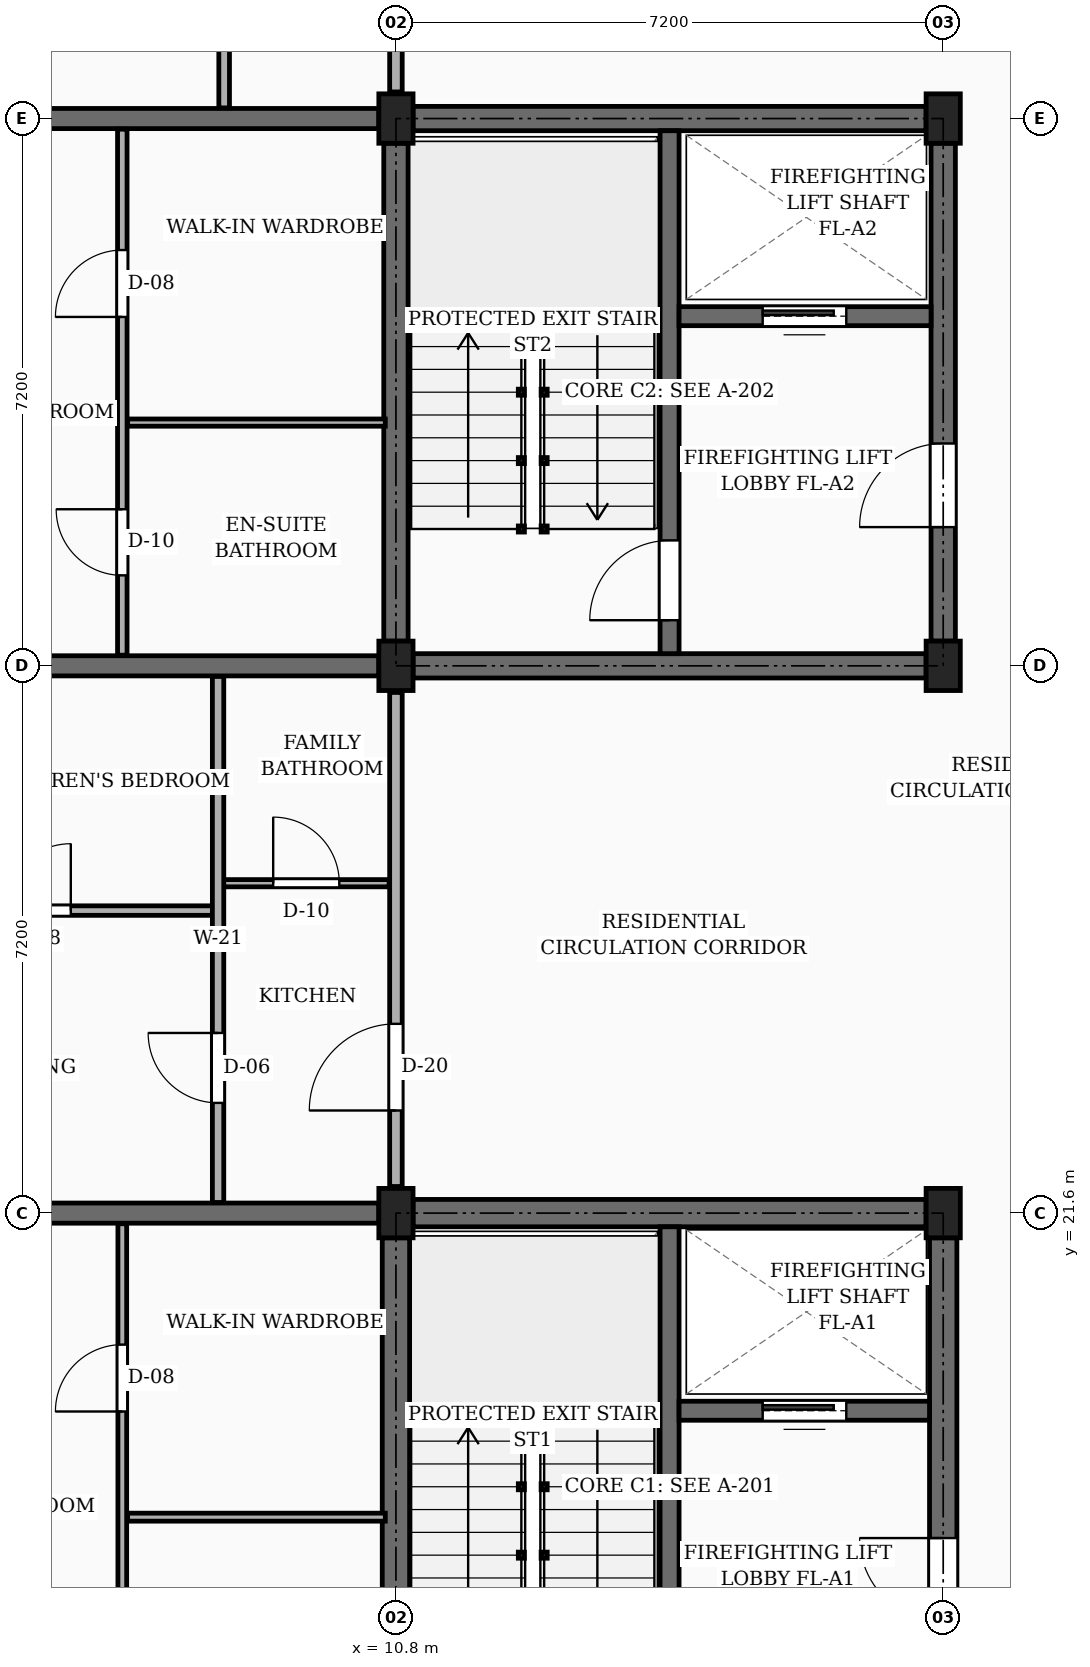
"""IFC4 building model, lengths in metres.
Left out: names, types, materials, properties, quantities, classifications, styles, units other than length and angle.
Written with IfcOpenShell. Run it as: python <this file> out.ifc"""

import sys

from ifc_helpers import new_model, si_unit, direction, frame, frame_2d, origin, origin_2d, place, context, subcontext, project, spatial, rectangle, extrude, element, fill, save


model = new_model("IFC4")
c1 = context("Model", 3, precision=1e-05, world=origin(), true_north=direction((0.0, 1.0)))
c2 = subcontext(c1, "Body", "Model", "MODEL_VIEW")
j1 = project(units=[si_unit("LENGTHUNIT", "METRE"), si_unit("PLANEANGLEUNIT", "RADIAN")], contexts=[c1])
p1 = place(None, origin())
s1 = spatial("IfcSite", under=j1, at=p1, CompositionType="ELEMENT")
p2 = place(p1, origin())
s2 = spatial("IfcBuilding", under=s1, at=p2, CompositionType="ELEMENT")
p3 = place(p2, frame((0.0, 0.0, 10.8)))
s3 = spatial("IfcBuildingStorey", under=s2, at=p3, CompositionType="ELEMENT", Elevation=10.8)
for number, where, z_axis, x_axis in (
    (1, (10.8, 21.6, 0.0), (0.0, 0.0, 1.0), (1.0, 0.0, 0.0)),
    (2, (10.8, 28.8, 0.0), (0.0, 0.0, 1.0), (1.0, 0.0, 0.0)),
    (3, (10.8, 36.0, 0.0), (0.0, 0.0, 1.0), (1.0, 0.0, 0.0)),
    (4, (18.0, 21.6, 0.0), (0.0, 0.0, 1.0), (1.0, 0.0, 0.0)),
    (5, (18.0, 28.8, 0.0), (0.0, 0.0, 1.0), (1.0, 0.0, 0.0)),
    (6, (18.0, 36.0, 0.0), (0.0, 0.0, 1.0), (1.0, 0.0, 0.0)),
):
    element("IfcColumn", number, at=place(p3, frame(where, z_axis=z_axis, x_axis=x_axis)), inside=s3, PredefinedType="COLUMN", context=c2, shape_type="SweptSolid", body=[
        extrude(rectangle(XDim=0.45, YDim=0.65, at=origin_2d()), origin(), (0.0, 0.0, 1.0), 3.15),
    ])
p4 = place(p3, frame((3.875, 21.6, 0.0), z_axis=(0.0, 0.0, 1.0), x_axis=(1.0, 0.0, 0.0)))
e7 = element("IfcWall", 7, at=p4, inside=s3, PredefinedType="SOLIDWALL", context=c2, shape_type="SweptSolid", body=[
    extrude(rectangle(XDim=6.7, YDim=0.265, at=frame_2d((3.35, 0.0))), origin(), (0.0, 0.0, 1.0), 2.17),
])
p5 = place(p3, frame((3.875, 28.8, 0.0), z_axis=(0.0, 0.0, 1.0), x_axis=(1.0, 0.0, 0.0)))
e8 = element("IfcWall", 8, at=p5, inside=s3, PredefinedType="SOLIDWALL", context=c2, shape_type="SweptSolid", body=[
    extrude(rectangle(XDim=6.7, YDim=0.265, at=frame_2d((3.35, 0.0))), origin(), (0.0, 0.0, 1.0), 2.17),
])
p6 = place(p5, frame((1.35, 0.0, 0.0)))
e9 = element("IfcOpeningElement", 9, at=p6, cuts=e8, PredefinedType="OPENING", context=c2, shape_type="SweptSolid", body=[
    extrude(rectangle(XDim=0.98, YDim=2.12, at=frame_2d((0.49, 1.06))), frame((0.0, 0.143, 0.0), z_axis=(0.0, -1.0, 0.0), x_axis=(1.0, 0.0, 0.0)), (0.0, 0.0, 1.0), 0.285),
])
p7 = place(p3, frame((3.875, 36.0, 0.0), z_axis=(0.0, 0.0, 1.0), x_axis=(1.0, 0.0, 0.0)))
e10 = element("IfcWall", 10, at=p7, inside=s3, PredefinedType="SOLIDWALL", context=c2, shape_type="SweptSolid", body=[
    extrude(rectangle(XDim=6.7, YDim=0.265, at=frame_2d((3.35, 0.0))), origin(), (0.0, 0.0, 1.0), 2.17),
])
p8 = place(p3, frame((10.8, 14.725, 0.0), z_axis=(0.0, 0.0, 1.0), x_axis=(0.0, 1.0, 0.0)))
e11 = element("IfcWall", 11, at=p8, inside=s3, PredefinedType="SHEAR", context=c2, shape_type="SweptSolid", body=[
    extrude(rectangle(XDim=6.55, YDim=0.36, at=frame_2d((3.275, 0.0))), origin(), (0.0, 0.0, 1.0), 2.87),
])
p9 = place(p3, frame((11.025, 21.6, 0.0), z_axis=(0.0, 0.0, 1.0), x_axis=(1.0, 0.0, 0.0)))
e12 = element("IfcWall", 12, at=p9, inside=s3, PredefinedType="SHEAR", context=c2, shape_type="SweptSolid", body=[
    extrude(rectangle(XDim=6.75, YDim=0.36, at=frame_2d((3.375, 0.0))), origin(), (0.0, 0.0, 1.0), 2.87),
])
p10 = place(p3, frame((18.0, 14.725, 0.0), z_axis=(0.0, 0.0, 1.0), x_axis=(0.0, 1.0, 0.0)))
e13 = element("IfcWall", 13, at=p10, inside=s3, PredefinedType="SHEAR", context=c2, shape_type="SweptSolid", body=[
    extrude(rectangle(XDim=6.55, YDim=0.36, at=frame_2d((3.275, 0.0))), origin(), (0.0, 0.0, 1.0), 2.87),
])
p11 = place(p10, frame((1.5, 0.0, 0.0)))
e14 = element("IfcOpeningElement", 14, at=p11, cuts=e13, PredefinedType="OPENING", context=c2, shape_type="SweptSolid", body=[
    extrude(rectangle(XDim=1.1, YDim=2.15, at=frame_2d((0.55, 1.075))), frame((0.0, 0.19, 0.0), z_axis=(0.0, -1.0, 0.0), x_axis=(1.0, 0.0, 0.0)), (0.0, 0.0, 1.0), 0.38),
])
p12 = place(p3, frame((14.4, 14.58, 0.0), z_axis=(0.0, 0.0, 1.0), x_axis=(0.0, 1.0, 0.0)))
e15 = element("IfcWall", 15, at=p12, inside=s3, PredefinedType="SHEAR", context=c2, shape_type="SweptSolid", body=[
    extrude(rectangle(XDim=6.84, YDim=0.25, at=frame_2d((3.42, 0.0))), origin(), (0.0, 0.0, 1.0), 2.87),
])
p13 = place(p12, frame((0.42, 0.0, 0.0)))
e16 = element("IfcOpeningElement", 16, at=p13, cuts=e15, PredefinedType="OPENING", context=c2, shape_type="SweptSolid", body=[
    extrude(rectangle(XDim=1.05, YDim=2.15, at=frame_2d((0.525, 1.075))), frame((0.0, 0.135, 0.0), z_axis=(0.0, -1.0, 0.0), x_axis=(1.0, 0.0, 0.0)), (0.0, 0.0, 1.0), 0.27),
])
p14 = place(p3, frame((14.525, 19.0, 0.0), z_axis=(0.0, 0.0, 1.0), x_axis=(1.0, 0.0, 0.0)))
e17 = element("IfcWall", 17, at=p14, inside=s3, PredefinedType="SHEAR", context=c2, shape_type="SweptSolid", body=[
    extrude(rectangle(XDim=3.295, YDim=0.25, at=frame_2d((1.647, 0.0))), origin(), (0.0, 0.0, 1.0), 2.87),
])
p15 = place(p14, frame((1.1, 0.0, 0.0)))
e18 = element("IfcOpeningElement", 18, at=p15, cuts=e17, PredefinedType="OPENING", context=c2, shape_type="SweptSolid", body=[
    extrude(rectangle(XDim=1.1, YDim=2.2, at=frame_2d((0.55, 1.1))), frame((0.0, 0.135, 0.0), z_axis=(0.0, -1.0, 0.0), x_axis=(1.0, 0.0, 0.0)), (0.0, 0.0, 1.0), 0.27),
])
p16 = place(p3, frame((10.8, 29.125, 0.0), z_axis=(0.0, 0.0, 1.0), x_axis=(0.0, 1.0, 0.0)))
e19 = element("IfcWall", 19, at=p16, inside=s3, PredefinedType="SHEAR", context=c2, shape_type="SweptSolid", body=[
    extrude(rectangle(XDim=6.55, YDim=0.32, at=frame_2d((3.275, 0.0))), origin(), (0.0, 0.0, 1.0), 2.87),
])
p17 = place(p3, frame((11.025, 36.0, 0.0), z_axis=(0.0, 0.0, 1.0), x_axis=(1.0, 0.0, 0.0)))
e20 = element("IfcWall", 20, at=p17, inside=s3, PredefinedType="SHEAR", context=c2, shape_type="SweptSolid", body=[
    extrude(rectangle(XDim=6.75, YDim=0.32, at=frame_2d((3.375, 0.0))), origin(), (0.0, 0.0, 1.0), 2.87),
])
p18 = place(p3, frame((18.0, 29.125, 0.0), z_axis=(0.0, 0.0, 1.0), x_axis=(0.0, 1.0, 0.0)))
e21 = element("IfcWall", 21, at=p18, inside=s3, PredefinedType="SHEAR", context=c2, shape_type="SweptSolid", body=[
    extrude(rectangle(XDim=6.55, YDim=0.32, at=frame_2d((3.275, 0.0))), origin(), (0.0, 0.0, 1.0), 2.87),
])
p19 = place(p18, frame((1.5, 0.0, 0.0)))
e22 = element("IfcOpeningElement", 22, at=p19, cuts=e21, PredefinedType="OPENING", context=c2, shape_type="SweptSolid", body=[
    extrude(rectangle(XDim=1.1, YDim=2.15, at=frame_2d((0.55, 1.075))), frame((0.0, 0.17, 0.0), z_axis=(0.0, -1.0, 0.0), x_axis=(1.0, 0.0, 0.0)), (0.0, 0.0, 1.0), 0.34),
])
p20 = place(p3, frame((11.025, 28.8, 0.0), z_axis=(0.0, 0.0, 1.0), x_axis=(1.0, 0.0, 0.0)))
e23 = element("IfcWall", 23, at=p20, inside=s3, PredefinedType="SHEAR", context=c2, shape_type="SweptSolid", body=[
    extrude(rectangle(XDim=6.75, YDim=0.32, at=frame_2d((3.375, 0.0))), origin(), (0.0, 0.0, 1.0), 2.87),
])
p21 = place(p3, frame((14.4, 28.96, 0.0), z_axis=(0.0, 0.0, 1.0), x_axis=(0.0, 1.0, 0.0)))
e24 = element("IfcWall", 24, at=p21, inside=s3, PredefinedType="SHEAR", context=c2, shape_type="SweptSolid", body=[
    extrude(rectangle(XDim=6.88, YDim=0.25, at=frame_2d((3.44, 0.0))), origin(), (0.0, 0.0, 1.0), 2.87),
])
p22 = place(p21, frame((0.44, 0.0, 0.0)))
e25 = element("IfcOpeningElement", 25, at=p22, cuts=e24, PredefinedType="OPENING", context=c2, shape_type="SweptSolid", body=[
    extrude(rectangle(XDim=1.05, YDim=2.15, at=frame_2d((0.525, 1.075))), frame((0.0, 0.135, 0.0), z_axis=(0.0, -1.0, 0.0), x_axis=(1.0, 0.0, 0.0)), (0.0, 0.0, 1.0), 0.27),
])
p23 = place(p3, frame((14.525, 33.4, 0.0), z_axis=(0.0, 0.0, 1.0), x_axis=(1.0, 0.0, 0.0)))
e26 = element("IfcWall", 26, at=p23, inside=s3, PredefinedType="SHEAR", context=c2, shape_type="SweptSolid", body=[
    extrude(rectangle(XDim=3.315, YDim=0.25, at=frame_2d((1.658, 0.0))), origin(), (0.0, 0.0, 1.0), 2.87),
])
p24 = place(p23, frame((1.1, 0.0, 0.0)))
e27 = element("IfcOpeningElement", 27, at=p24, cuts=e26, PredefinedType="OPENING", context=c2, shape_type="SweptSolid", body=[
    extrude(rectangle(XDim=1.1, YDim=2.2, at=frame_2d((0.55, 1.1))), frame((0.0, 0.135, 0.0), z_axis=(0.0, -1.0, 0.0), x_axis=(1.0, 0.0, 0.0)), (0.0, 0.0, 1.0), 0.27),
])
p25 = place(p3, frame((10.8, 21.95, 0.0), z_axis=(0.0, 0.0, 1.0), x_axis=(0.0, 1.0, 0.0)))
e28 = element("IfcWall", 28, at=p25, inside=s3, PredefinedType="PARTITIONING", context=c2, shape_type="SweptSolid", body=[
    extrude(rectangle(XDim=6.5, YDim=0.165, at=frame_2d((3.25, 0.0))), origin(), (0.0, 0.0, 1.0), 2.22),
])
p26 = place(p25, frame((1.0, 0.0, 0.0)))
e29 = element("IfcOpeningElement", 29, at=p26, cuts=e28, PredefinedType="OPENING", context=c2, shape_type="SweptSolid", body=[
    extrude(rectangle(XDim=1.14, YDim=2.18, at=frame_2d((0.57, 1.09))), frame((0.0, 0.093, 0.0), z_axis=(0.0, -1.0, 0.0), x_axis=(1.0, 0.0, 0.0)), (0.0, 0.0, 1.0), 0.185),
])
p27 = place(p3, frame((10.8, 36.35, 0.0), z_axis=(0.0, 0.0, 1.0), x_axis=(0.0, 1.0, 0.0)))
e30 = element("IfcWall", 30, at=p27, inside=s3, PredefinedType="PARTITIONING", context=c2, shape_type="SweptSolid", body=[
    extrude(rectangle(XDim=6.5, YDim=0.165, at=frame_2d((3.25, 0.0))), origin(), (0.0, 0.0, 1.0), 2.22),
])
p28 = place(p27, frame((1.0, 0.0, 0.0)))
e31 = element("IfcOpeningElement", 31, at=p28, cuts=e30, PredefinedType="OPENING", context=c2, shape_type="SweptSolid", body=[
    extrude(rectangle(XDim=1.0, YDim=2.15, at=frame_2d((0.5, 1.075))), frame((0.0, 0.093, 0.0), z_axis=(0.0, -1.0, 0.0), x_axis=(1.0, 0.0, 0.0)), (0.0, 0.0, 1.0), 0.185),
])
p29 = place(p3, frame((7.2, 14.54, 0.0), z_axis=(0.0, 0.0, 1.0), x_axis=(0.0, 1.0, 0.0)))
e32 = element("IfcWall", 32, at=p29, inside=s3, PredefinedType="PARTITIONING", context=c2, shape_type="SweptSolid", body=[
    extrude(rectangle(XDim=6.92, YDim=0.115, at=frame_2d((3.46, 0.0))), origin(), (0.0, 0.0, 1.0), 2.305),
])
p30 = place(p29, frame((1.05, 0.0, 0.0)))
e33 = element("IfcOpeningElement", 33, at=p30, cuts=e32, PredefinedType="OPENING", context=c2, shape_type="SweptSolid", body=[
    extrude(rectangle(XDim=0.87, YDim=2.05, at=frame_2d((0.435, 1.025))), frame((0.0, 0.067, 0.0), z_axis=(0.0, -1.0, 0.0), x_axis=(1.0, 0.0, 0.0)), (0.0, 0.0, 1.0), 0.135),
])
p31 = place(p29, frame((4.45, 0.0, 0.0)))
e34 = element("IfcOpeningElement", 34, at=p31, cuts=e32, PredefinedType="OPENING", context=c2, shape_type="SweptSolid", body=[
    extrude(rectangle(XDim=0.88, YDim=2.08, at=frame_2d((0.44, 1.04))), frame((0.0, 0.067, 0.0), z_axis=(0.0, -1.0, 0.0), x_axis=(1.0, 0.0, 0.0)), (0.0, 0.0, 1.0), 0.135),
])
p32 = place(p3, frame((7.27, 17.6, 0.0), z_axis=(0.0, 0.0, 1.0), x_axis=(1.0, 0.0, 0.0)))
e35 = element("IfcWall", 35, at=p32, inside=s3, PredefinedType="PARTITIONING", context=c2, shape_type="SweptSolid", body=[
    extrude(rectangle(XDim=3.39, YDim=0.105, at=frame_2d((1.695, 0.0))), origin(), (0.0, 0.0, 1.0), 2.305),
])
p33 = place(p3, frame((3.775, 25.58, 0.0), z_axis=(0.0, 0.0, 1.0), x_axis=(1.0, 0.0, 0.0)))
e36 = element("IfcWall", 36, at=p33, inside=s3, PredefinedType="PARTITIONING", context=c2, shape_type="SweptSolid", body=[
    extrude(rectangle(XDim=4.615, YDim=0.125, at=frame_2d((2.308, 0.0))), origin(), (0.0, 0.0, 1.0), 2.305),
])
p34 = place(p33, frame((1.867, 0.0, 0.0)))
e37 = element("IfcOpeningElement", 37, at=p34, cuts=e36, PredefinedType="OPENING", context=c2, shape_type="SweptSolid", body=[
    extrude(rectangle(XDim=0.88, YDim=2.08, at=frame_2d((0.44, 1.04))), frame((0.0, 0.073, 0.0), z_axis=(0.0, -1.0, 0.0), x_axis=(1.0, 0.0, 0.0)), (0.0, 0.0, 1.0), 0.145),
])
p35 = place(p3, frame((8.53, 25.94, 0.0), z_axis=(0.0, 0.0, 1.0), x_axis=(1.0, 0.0, 0.0)))
e38 = element("IfcWall", 38, at=p35, inside=s3, PredefinedType="PARTITIONING", context=c2, shape_type="SweptSolid", body=[
    extrude(rectangle(XDim=2.18, YDim=0.095, at=frame_2d((1.09, 0.0))), origin(), (0.0, 0.0, 1.0), 2.305),
])
p36 = place(p35, frame((0.655, 0.0, 0.0)))
e39 = element("IfcOpeningElement", 39, at=p36, cuts=e38, PredefinedType="OPENING", context=c2, shape_type="SweptSolid", body=[
    extrude(rectangle(XDim=0.87, YDim=2.05, at=frame_2d((0.435, 1.025))), frame((0.0, 0.058, 0.0), z_axis=(0.0, -1.0, 0.0), x_axis=(1.0, 0.0, 0.0)), (0.0, 0.0, 1.0), 0.115),
])
p37 = place(p3, frame((8.46, 21.74, 0.0), z_axis=(0.0, 0.0, 1.0), x_axis=(0.0, 1.0, 0.0)))
e40 = element("IfcWall", 40, at=p37, inside=s3, PredefinedType="PARTITIONING", context=c2, shape_type="SweptSolid", body=[
    extrude(rectangle(XDim=6.92, YDim=0.15, at=frame_2d((3.46, 0.0))), origin(), (0.0, 0.0, 1.0), 2.305),
])
p38 = place(p37, frame((1.31, 0.0, 0.0)))
e41 = element("IfcOpeningElement", 41, at=p38, cuts=e40, PredefinedType="OPENING", context=c2, shape_type="SweptSolid", body=[
    extrude(rectangle(XDim=0.92, YDim=2.1, at=frame_2d((0.46, 1.05))), frame((0.0, 0.085, 0.0), z_axis=(0.0, -1.0, 0.0), x_axis=(1.0, 0.0, 0.0)), (0.0, 0.0, 1.0), 0.17),
])
p39 = place(p3, frame((7.2, 28.94, 0.0), z_axis=(0.0, 0.0, 1.0), x_axis=(0.0, 1.0, 0.0)))
e42 = element("IfcWall", 42, at=p39, inside=s3, PredefinedType="PARTITIONING", context=c2, shape_type="SweptSolid", body=[
    extrude(rectangle(XDim=6.92, YDim=0.125, at=frame_2d((3.46, 0.0))), origin(), (0.0, 0.0, 1.0), 2.305),
])
p40 = place(p39, frame((1.05, 0.0, 0.0)))
e43 = element("IfcOpeningElement", 43, at=p40, cuts=e42, PredefinedType="OPENING", context=c2, shape_type="SweptSolid", body=[
    extrude(rectangle(XDim=0.87, YDim=2.05, at=frame_2d((0.435, 1.025))), frame((0.0, 0.073, 0.0), z_axis=(0.0, -1.0, 0.0), x_axis=(1.0, 0.0, 0.0)), (0.0, 0.0, 1.0), 0.145),
])
p41 = place(p39, frame((4.45, 0.0, 0.0)))
e44 = element("IfcOpeningElement", 44, at=p41, cuts=e42, PredefinedType="OPENING", context=c2, shape_type="SweptSolid", body=[
    extrude(rectangle(XDim=0.88, YDim=2.08, at=frame_2d((0.44, 1.04))), frame((0.0, 0.073, 0.0), z_axis=(0.0, -1.0, 0.0), x_axis=(1.0, 0.0, 0.0)), (0.0, 0.0, 1.0), 0.145),
])
p42 = place(p3, frame((7.27, 32.0, 0.0), z_axis=(0.0, 0.0, 1.0), x_axis=(1.0, 0.0, 0.0)))
e45 = element("IfcWall", 45, at=p42, inside=s3, PredefinedType="PARTITIONING", context=c2, shape_type="SweptSolid", body=[
    extrude(rectangle(XDim=3.39, YDim=0.095, at=frame_2d((1.695, 0.0))), origin(), (0.0, 0.0, 1.0), 2.305),
])
p43 = place(p3, frame((8.54, 36.14, 0.0), z_axis=(0.0, 0.0, 1.0), x_axis=(0.0, 1.0, 0.0)))
e46 = element("IfcWall", 46, at=p43, inside=s3, PredefinedType="PARTITIONING", context=c2, shape_type="SweptSolid", body=[
    extrude(rectangle(XDim=6.92, YDim=0.14, at=frame_2d((3.46, 0.0))), origin(), (0.0, 0.0, 1.0), 2.305),
])
p44 = place(p43, frame((1.31, 0.0, 0.0)))
e47 = element("IfcOpeningElement", 47, at=p44, cuts=e46, PredefinedType="OPENING", context=c2, shape_type="SweptSolid", body=[
    extrude(rectangle(XDim=0.95, YDim=2.1, at=frame_2d((0.475, 1.05))), frame((0.0, 0.08, 0.0), z_axis=(0.0, -1.0, 0.0), x_axis=(1.0, 0.0, 0.0)), (0.0, 0.0, 1.0), 0.16),
])
p45 = place(p11, frame((1.1, 0.0, 0.0), z_axis=(0.0, 0.0, 1.0), x_axis=(-1.0, 0.0, 0.0)))
e48 = element("IfcDoor", 48, at=p45, inside=s3, OperationType="SINGLE_SWING_RIGHT", PredefinedType="DOOR", context=c2, shape_type="SweptSolid", body=[
    extrude(rectangle(XDim=1.1, YDim=2.15, at=frame_2d((0.55, 1.075))), frame((0.0, 0.025, 0.0), z_axis=(0.0, -1.0, 0.0), x_axis=(1.0, 0.0, 0.0)), (0.0, 0.0, 1.0), 0.05),
])
fill(e14, e48)
p46 = place(p15, origin())
e49 = element("IfcDoor", 49, at=p46, inside=s3, OperationType="SLIDING_TO_LEFT", PredefinedType="DOOR", context=c2, shape_type="SweptSolid", body=[
    extrude(rectangle(XDim=1.1, YDim=2.2, at=frame_2d((0.55, 1.1))), frame((0.0, 0.025, 0.0), z_axis=(0.0, -1.0, 0.0), x_axis=(1.0, 0.0, 0.0)), (0.0, 0.0, 1.0), 0.05),
])
fill(e18, e49)
p47 = place(p19, frame((1.1, 0.0, 0.0), z_axis=(0.0, 0.0, 1.0), x_axis=(-1.0, 0.0, 0.0)))
e50 = element("IfcDoor", 50, at=p47, inside=s3, OperationType="SINGLE_SWING_LEFT", PredefinedType="DOOR", context=c2, shape_type="SweptSolid", body=[
    extrude(rectangle(XDim=1.1, YDim=2.15, at=frame_2d((0.55, 1.075))), frame((0.0, 0.025, 0.0), z_axis=(0.0, -1.0, 0.0), x_axis=(1.0, 0.0, 0.0)), (0.0, 0.0, 1.0), 0.05),
])
fill(e22, e50)
p48 = place(p22, origin())
e51 = element("IfcDoor", 51, at=p48, inside=s3, OperationType="SINGLE_SWING_LEFT", PredefinedType="DOOR", context=c2, shape_type="SweptSolid", body=[
    extrude(rectangle(XDim=1.05, YDim=2.15, at=frame_2d((0.525, 1.075))), frame((0.0, 0.025, 0.0), z_axis=(0.0, -1.0, 0.0), x_axis=(1.0, 0.0, 0.0)), (0.0, 0.0, 1.0), 0.05),
])
fill(e25, e51)
p49 = place(p24, origin())
e52 = element("IfcDoor", 52, at=p49, inside=s3, OperationType="SLIDING_TO_LEFT", PredefinedType="DOOR", context=c2, shape_type="SweptSolid", body=[
    extrude(rectangle(XDim=1.1, YDim=2.2, at=frame_2d((0.55, 1.1))), frame((0.0, 0.025, 0.0), z_axis=(0.0, -1.0, 0.0), x_axis=(1.0, 0.0, 0.0)), (0.0, 0.0, 1.0), 0.05),
])
fill(e27, e52)
p50 = place(p26, origin())
e53 = element("IfcDoor", 53, at=p50, inside=s3, OperationType="SINGLE_SWING_LEFT", PredefinedType="DOOR", context=c2, shape_type="SweptSolid", body=[
    extrude(rectangle(XDim=1.14, YDim=2.18, at=frame_2d((0.57, 1.09))), frame((0.0, 0.025, 0.0), z_axis=(0.0, -1.0, 0.0), x_axis=(1.0, 0.0, 0.0)), (0.0, 0.0, 1.0), 0.05),
])
fill(e29, e53)
p51 = place(p31, origin())
e54 = element("IfcDoor", 54, at=p51, inside=s3, OperationType="SINGLE_SWING_LEFT", PredefinedType="DOOR", context=c2, shape_type="SweptSolid", body=[
    extrude(rectangle(XDim=0.88, YDim=2.08, at=frame_2d((0.44, 1.04))), frame((0.0, 0.025, 0.0), z_axis=(0.0, -1.0, 0.0), x_axis=(1.0, 0.0, 0.0)), (0.0, 0.0, 1.0), 0.05),
])
fill(e34, e54)
p52 = place(p34, origin())
e55 = element("IfcDoor", 55, at=p52, inside=s3, OperationType="SINGLE_SWING_RIGHT", PredefinedType="DOOR", context=c2, shape_type="SweptSolid", body=[
    extrude(rectangle(XDim=0.88, YDim=2.08, at=frame_2d((0.44, 1.04))), frame((0.0, 0.025, 0.0), z_axis=(0.0, -1.0, 0.0), x_axis=(1.0, 0.0, 0.0)), (0.0, 0.0, 1.0), 0.05),
])
fill(e37, e55)
p53 = place(p36, origin())
e56 = element("IfcDoor", 56, at=p53, inside=s3, OperationType="SINGLE_SWING_LEFT", PredefinedType="DOOR", context=c2, shape_type="SweptSolid", body=[
    extrude(rectangle(XDim=0.87, YDim=2.05, at=frame_2d((0.435, 1.025))), frame((0.0, 0.025, 0.0), z_axis=(0.0, -1.0, 0.0), x_axis=(1.0, 0.0, 0.0)), (0.0, 0.0, 1.0), 0.05),
])
fill(e39, e56)
p54 = place(p38, origin())
e57 = element("IfcDoor", 57, at=p54, inside=s3, OperationType="SINGLE_SWING_RIGHT", PredefinedType="DOOR", context=c2, shape_type="SweptSolid", body=[
    extrude(rectangle(XDim=0.92, YDim=2.1, at=frame_2d((0.46, 1.05))), frame((0.0, 0.025, 0.0), z_axis=(0.0, -1.0, 0.0), x_axis=(1.0, 0.0, 0.0)), (0.0, 0.0, 1.0), 0.05),
])
fill(e41, e57)
p55 = place(p40, origin())
e58 = element("IfcDoor", 58, at=p55, inside=s3, OperationType="SINGLE_SWING_RIGHT", PredefinedType="DOOR", context=c2, shape_type="SweptSolid", body=[
    extrude(rectangle(XDim=0.87, YDim=2.05, at=frame_2d((0.435, 1.025))), frame((0.0, 0.025, 0.0), z_axis=(0.0, -1.0, 0.0), x_axis=(1.0, 0.0, 0.0)), (0.0, 0.0, 1.0), 0.05),
])
fill(e43, e58)
p56 = place(p41, origin())
e59 = element("IfcDoor", 59, at=p56, inside=s3, OperationType="SINGLE_SWING_LEFT", PredefinedType="DOOR", context=c2, shape_type="SweptSolid", body=[
    extrude(rectangle(XDim=0.88, YDim=2.08, at=frame_2d((0.44, 1.04))), frame((0.0, 0.025, 0.0), z_axis=(0.0, -1.0, 0.0), x_axis=(1.0, 0.0, 0.0)), (0.0, 0.0, 1.0), 0.05),
])
fill(e44, e59)
save(model, sys.argv[1])
